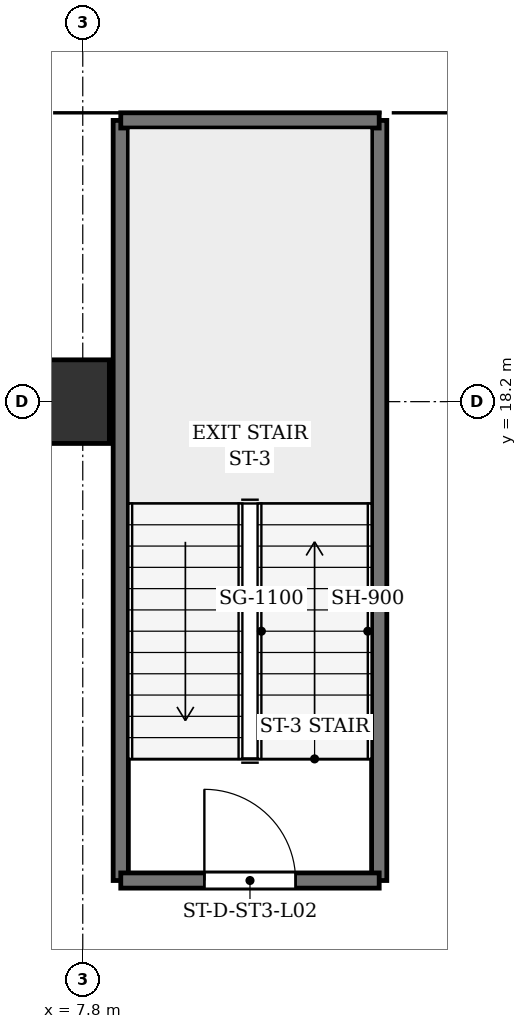
"""IFC4 building model, lengths in metres.
Left out: names, types, materials, properties, quantities, classifications, styles, units other than length and angle.
Written with IfcOpenShell. Run it as: python <this file> out.ifc"""

import sys

from ifc_helpers import new_model, si_unit, direction, frame, frame_2d, origin, origin_2d, place, context, subcontext, project, spatial, rectangle, extrude, source, transform, mapped, element, fill, save


model = new_model("IFC4")
c1 = context("Model", 3, precision=1e-05, world=origin(), true_north=direction((0.0, 1.0)))
c2 = subcontext(c1, "Body", "Model", "MODEL_VIEW")
j1 = project(units=[si_unit("LENGTHUNIT", "METRE"), si_unit("PLANEANGLEUNIT", "RADIAN")], contexts=[c1])
p1 = place(None, origin())
s1 = spatial("IfcSite", under=j1, at=p1, CompositionType="ELEMENT")
p2 = place(p1, origin())
s2 = spatial("IfcBuilding", under=s1, at=p2, CompositionType="ELEMENT")
p3 = place(p2, frame((0.0, 0.0, 9.7)))
s3 = spatial("IfcBuildingStorey", under=s2, at=p3, CompositionType="ELEMENT", Elevation=9.7)
m1 = source(origin(), c2, "Body", "SweptSolid", [
    extrude(rectangle(XDim=1.1, YDim=1.1, at=origin_2d()), origin(), (0.0, 0.0, 1.0), 4.5),
])
p4 = place(p3, frame((7.6, 18.2, 0.0), z_axis=(0.0, 0.0, 1.0), x_axis=(1.0, 0.0, 0.0)))
e1 = element("IfcColumn", 1, at=p4, inside=s3, PredefinedType="COLUMN", context=c2, shape_type="MappedRepresentation", body=[
    mapped(m1, transform((0.0, 0.0, 0.0), x_axis=(1.0, 0.0, 0.0), y_axis=(0.0, 1.0, 0.0), z_axis=(0.0, 0.0, 1.0), scale=1.0)),
])
for number, where, z_axis, x_axis in (
    (2, (8.3, 11.9, 0.0), (0.0, 0.0, 1.0), (0.0, 1.0, 0.0)),
    (3, (11.7, 11.9, 0.0), (0.0, 0.0, 1.0), (0.0, 1.0, 0.0)),
):
    element("IfcWall", number, at=place(p3, frame(where, z_axis=z_axis, x_axis=x_axis)), inside=s3, PredefinedType="SHEAR", context=c2, shape_type="SweptSolid", body=[
        extrude(rectangle(XDim=10.0, YDim=0.2, at=frame_2d((5.0, 0.0))), origin(), (0.0, 0.0, 1.0), 4.2),
    ])
p5 = place(p3, frame((8.3, 11.9, 0.0), z_axis=(0.0, 0.0, 1.0), x_axis=(1.0, 0.0, 0.0)))
e4 = element("IfcWall", 4, at=p5, inside=s3, PredefinedType="SHEAR", context=c2, shape_type="SweptSolid", body=[
    extrude(rectangle(XDim=3.4, YDim=0.2, at=frame_2d((1.7, 0.0))), origin(), (0.0, 0.0, 1.0), 4.2),
])
p6 = place(p5, frame((1.1, 0.0, 0.0)))
e5 = element("IfcOpeningElement", 5, at=p6, cuts=e4, PredefinedType="OPENING", context=c2, shape_type="SweptSolid", body=[
    extrude(rectangle(XDim=1.2, YDim=2.15, at=frame_2d((0.6, 1.075))), frame((0.0, 0.11, 0.0), z_axis=(0.0, -1.0, 0.0), x_axis=(1.0, 0.0, 0.0)), (0.0, 0.0, 1.0), 0.22),
])
p7 = place(p3, frame((8.3, 21.9, 0.0), z_axis=(0.0, 0.0, 1.0), x_axis=(1.0, 0.0, 0.0)))
e6 = element("IfcWall", 6, at=p7, inside=s3, PredefinedType="SHEAR", context=c2, shape_type="SweptSolid", body=[
    extrude(rectangle(XDim=3.4, YDim=0.2, at=frame_2d((1.7, 0.0))), origin(), (0.0, 0.0, 1.0), 4.2),
])
m2 = source(origin(), c2, "Body", "SweptSolid", [
    extrude(rectangle(XDim=1.2, YDim=2.15, at=frame_2d((0.6, 1.075))), frame((0.0, 0.025, 0.0), z_axis=(0.0, -1.0, 0.0), x_axis=(1.0, 0.0, 0.0)), (0.0, 0.0, 1.0), 0.05),
])
p8 = place(p6, origin())
e7 = element("IfcDoor", 7, at=p8, inside=s3, OperationType="SINGLE_SWING_LEFT", PredefinedType="DOOR", context=c2, shape_type="MappedRepresentation", body=[
    mapped(m2, transform((0.0, 0.0, 0.0), x_axis=(1.0, 0.0, 0.0), y_axis=(0.0, 1.0, 0.0), z_axis=(0.0, 0.0, 1.0), scale=1.0)),
])
fill(e5, e7)
save(model, sys.argv[1])
